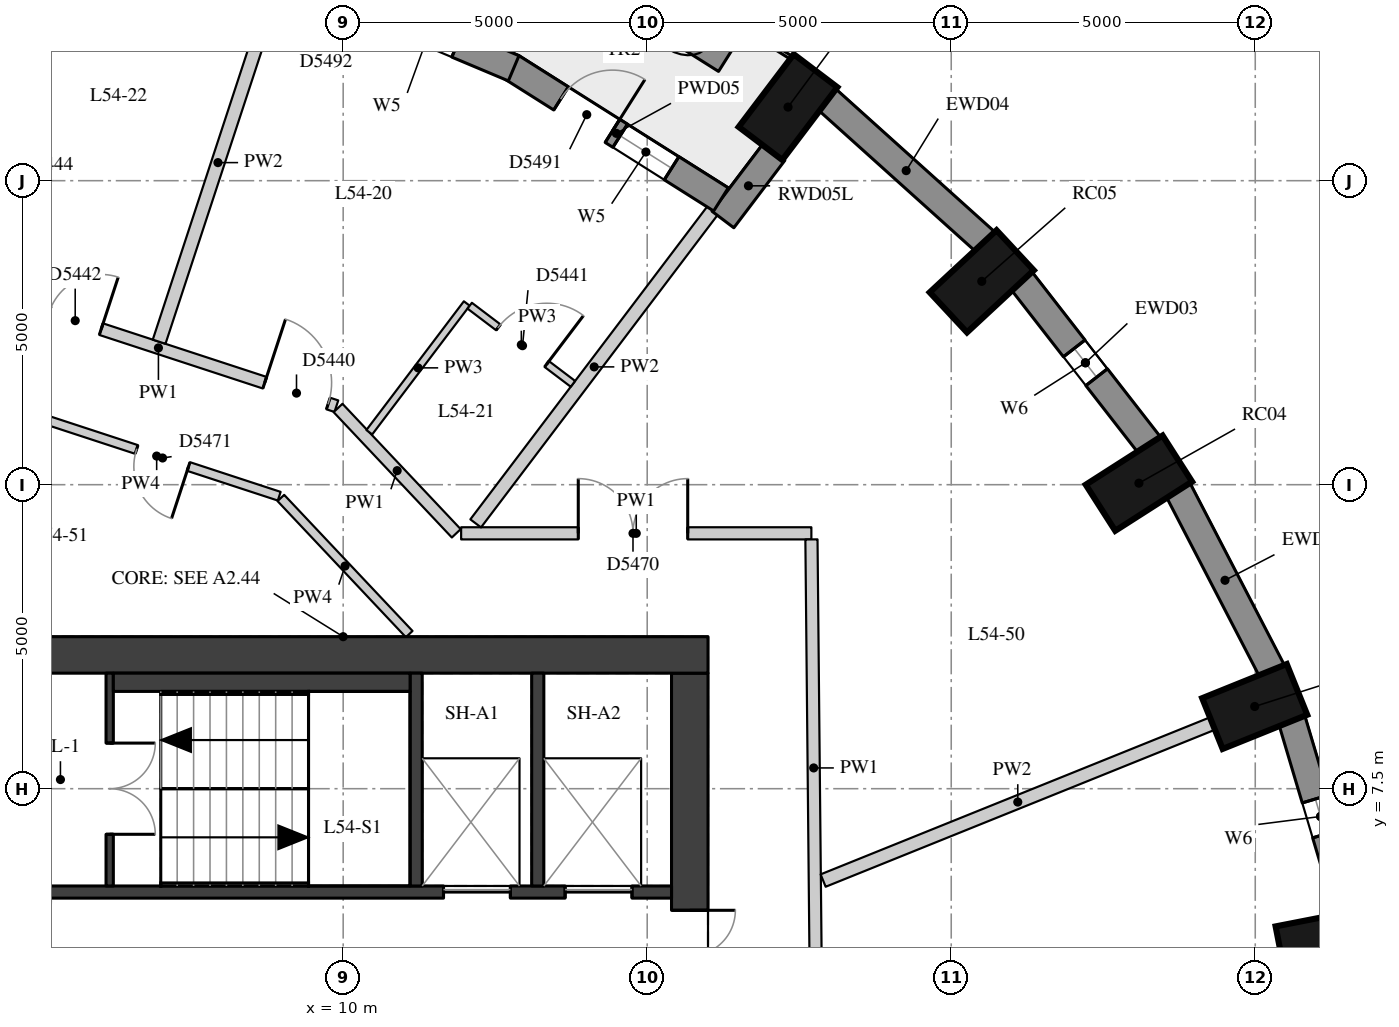
"""IFC4 building model, lengths in metres.
Left out: names, types, materials, properties, quantities, classifications, styles, units other than length and angle.
Written with IfcOpenShell. Run it as: python <this file> out.ifc"""

import sys

from ifc_helpers import new_model, si_unit, direction, frame, frame_2d, origin, origin_2d, place, context, subcontext, project, spatial, rectangle, extrude, element, fill, save


model = new_model("IFC4")
c1 = context("Model", 3, precision=1e-05, world=origin(), true_north=direction((0.0, 1.0)))
c2 = subcontext(c1, "Body", "Model", "MODEL_VIEW")
j1 = project(units=[si_unit("LENGTHUNIT", "METRE"), si_unit("PLANEANGLEUNIT", "RADIAN")], contexts=[c1])
p1 = place(None, origin())
s1 = spatial("IfcSite", under=j1, at=p1, CompositionType="ELEMENT")
p2 = place(p1, origin())
s2 = spatial("IfcBuilding", under=s1, at=p2, CompositionType="ELEMENT")
p3 = place(p2, frame((0.0, 0.0, 192.5)))
s3 = spatial("IfcBuildingStorey", under=s2, at=p3, CompositionType="ELEMENT", Elevation=192.5)
for number, where, z_axis, x_axis in (
    (1, (26.157, 4.937, 0.0), (0.0, 0.0, 1.0), (0.981, 0.192, 0.0)),
    (2, (24.991, 8.852, 0.0), (0.0, 0.0, 1.0), (0.927, 0.374, 0.0)),
    (3, (23.087, 12.525, 0.0), (0.0, 0.0, 1.0), (0.842, 0.539, 0.0)),
    (4, (20.502, 15.845, 0.0), (0.0, 0.0, 1.0), (0.732, 0.681, 0.0)),
    (5, (17.316, 18.71, 0.0), (0.0, 0.0, 1.0), (0.604, 0.797, 0.0)),
):
    element("IfcColumn", number, at=place(p3, frame(where, z_axis=z_axis, x_axis=x_axis)), inside=s3, PredefinedType="COLUMN", context=c2, shape_type="SweptSolid", body=[
        extrude(rectangle(XDim=1.5, YDim=0.9, at=origin_2d()), origin(), (0.0, 0.0, 1.0), 3.3),
    ])
p4 = place(p3, frame((26.548, 5.452, 0.0), z_axis=(0.0, 0.0, 1.0), x_axis=(-0.285444972963, 0.958395099847, 0.0)))
e6 = element("IfcWall", 6, at=p4, inside=s3, PredefinedType="SOLIDWALL", context=c2, shape_type="SweptSolid", body=[
    extrude(rectangle(XDim=3.32, YDim=0.45, at=frame_2d((1.66, 0.0))), origin(), (0.0, 0.0, 1.0), 3.02),
])
p5 = place(p4, frame((1.36, 0.0, 0.4)))
e7 = element("IfcOpeningElement", 7, at=p5, cuts=e6, PredefinedType="OPENING", context=c2, shape_type="SweptSolid", body=[
    extrude(rectangle(XDim=0.6, YDim=1.75, at=frame_2d((0.3, 0.875))), frame((0.0, 0.235, 0.0), z_axis=(0.0, -1.0, 0.0), x_axis=(1.0, 0.0, 0.0)), (0.0, 0.0, 1.0), 0.47),
])
p6 = place(p3, frame((25.278, 9.432, 0.0), z_axis=(0.0, 0.0, 1.0), x_axis=(-0.460175500475, 0.887827972505, 0.0)))
e8 = element("IfcWall", 8, at=p6, inside=s3, PredefinedType="SOLIDWALL", context=c2, shape_type="SweptSolid", body=[
    extrude(rectangle(XDim=3.371, YDim=0.45, at=frame_2d((1.685, 0.0))), origin(), (0.0, 0.0, 1.0), 3.02),
])
p7 = place(p3, frame((23.263, 13.148, 0.0), z_axis=(0.0, 0.0, 1.0), x_axis=(-0.614220816451, 0.789134201919, 0.0)))
e9 = element("IfcWall", 9, at=p7, inside=s3, PredefinedType="SOLIDWALL", context=c2, shape_type="SweptSolid", body=[
    extrude(rectangle(XDim=3.438, YDim=0.45, at=frame_2d((1.719, 0.0))), origin(), (0.0, 0.0, 1.0), 3.02),
])
p8 = place(p7, frame((1.419, 0.0, 0.4)))
e10 = element("IfcOpeningElement", 10, at=p8, cuts=e9, PredefinedType="OPENING", context=c2, shape_type="SweptSolid", body=[
    extrude(rectangle(XDim=0.6, YDim=1.75, at=frame_2d((0.3, 0.875))), frame((0.0, 0.235, 0.0), z_axis=(0.0, -1.0, 0.0), x_axis=(1.0, 0.0, 0.0)), (0.0, 0.0, 1.0), 0.47),
])
p9 = place(p3, frame((20.565, 16.49, 0.0), z_axis=(0.0, 0.0, 1.0), x_axis=(-0.743442727602, 0.668799604348, 0.0)))
e11 = element("IfcWall", 11, at=p9, inside=s3, PredefinedType="SOLIDWALL", context=c2, shape_type="SweptSolid", body=[
    extrude(rectangle(XDim=3.513, YDim=0.45, at=frame_2d((1.756, 0.0))), origin(), (0.0, 0.0, 1.0), 3.02),
])
p10 = place(p3, frame((17.085, 17.97, 0.0), z_axis=(0.0, 0.0, 1.0), x_axis=(-0.603644757989, -0.797253414011, 0.0)))
e12 = element("IfcWall", 12, at=p10, inside=s3, PredefinedType="SOLIDWALL", context=c2, shape_type="SweptSolid", body=[
    extrude(rectangle(XDim=1.391, YDim=0.45, at=frame_2d((0.695, 0.0))), origin(), (0.0, 0.0, 1.0), 3.02),
])
p11 = place(p3, frame((16.213, 17.192, 0.0), z_axis=(0.0, 0.0, 1.0), x_axis=(-0.84545185308, 0.534051649303, 0.0)))
e13 = element("IfcWall", 13, at=p11, inside=s3, PredefinedType="SOLIDWALL", context=c2, shape_type="SweptSolid", body=[
    extrude(rectangle(XDim=4.071, YDim=0.45, at=frame_2d((2.036, 0.0))), origin(), (0.0, 0.0, 1.0), 3.02),
])
p12 = place(p11, frame((0.961, 0.0, 0.4)))
e14 = element("IfcOpeningElement", 14, at=p12, cuts=e13, PredefinedType="OPENING", context=c2, shape_type="SweptSolid", body=[
    extrude(rectangle(XDim=1.0, YDim=1.75, at=frame_2d((0.5, 0.875))), frame((0.0, 0.235, 0.0), z_axis=(0.0, -1.0, 0.0), x_axis=(1.0, 0.0, 0.0)), (0.0, 0.0, 1.0), 0.47),
])
p13 = place(p11, frame((2.111, 0.0, 0.0)))
e15 = element("IfcOpeningElement", 15, at=p13, cuts=e13, PredefinedType="OPENING", context=c2, shape_type="SweptSolid", body=[
    extrude(rectangle(XDim=1.0, YDim=2.15, at=frame_2d((0.5, 1.075))), frame((0.0, 0.235, 0.0), z_axis=(0.0, -1.0, 0.0), x_axis=(1.0, 0.0, 0.0)), (0.0, 0.0, 1.0), 0.47),
])
p14 = place(p3, frame((12.804, 19.349, 0.0), z_axis=(0.0, 0.0, 1.0), x_axis=(-0.921751093055, 0.387782055351, 0.0)))
e16 = element("IfcWall", 16, at=p14, inside=s3, PredefinedType="SOLIDWALL", context=c2, shape_type="SweptSolid", body=[
    extrude(rectangle(XDim=4.168, YDim=0.45, at=frame_2d((2.084, 0.0))), origin(), (0.0, 0.0, 1.0), 3.02),
])
p15 = place(p14, frame((1.009, 0.0, 0.4)))
e17 = element("IfcOpeningElement", 17, at=p15, cuts=e16, PredefinedType="OPENING", context=c2, shape_type="SweptSolid", body=[
    extrude(rectangle(XDim=1.0, YDim=1.75, at=frame_2d((0.5, 0.875))), frame((0.0, 0.235, 0.0), z_axis=(0.0, -1.0, 0.0), x_axis=(1.0, 0.0, 0.0)), (0.0, 0.0, 1.0), 0.47),
])
p16 = place(p14, frame((2.159, 0.0, 0.0)))
e18 = element("IfcOpeningElement", 18, at=p16, cuts=e16, PredefinedType="OPENING", context=c2, shape_type="SweptSolid", body=[
    extrude(rectangle(XDim=1.0, YDim=2.15, at=frame_2d((0.5, 1.075))), frame((0.0, 0.235, 0.0), z_axis=(0.0, -1.0, 0.0), x_axis=(1.0, 0.0, 0.0)), (0.0, 0.0, 1.0), 0.47),
])
p17 = place(p3, frame((16.36, 19.593, 0.0), z_axis=(0.0, 0.0, 1.0), x_axis=(-0.846149017978, 0.532946375703, 0.0)))
e19 = element("IfcWall", 19, at=p17, inside=s3, PredefinedType="USERDEFINED", context=c2, shape_type="SweptSolid", body=[
    extrude(rectangle(XDim=1.8, YDim=0.7, at=frame_2d((0.9, 0.0))), origin(), (0.0, 0.0, 1.0), 0.75),
])
p18 = place(p3, frame((15.7, -9.4, 0.0), z_axis=(0.0, 0.0, 1.0), x_axis=(0.0, 1.0, 0.0)))
e20 = element("IfcWall", 20, at=p18, inside=s3, PredefinedType="SHEAR", context=c2, shape_type="SweptSolid", body=[
    extrude(rectangle(XDim=18.8, YDim=0.6, at=frame_2d((9.4, 0.0))), origin(), (0.0, 0.0, 1.0), 3.02),
])
p19 = place(p18, frame((13.4, 0.0, 0.0)))
e21 = element("IfcOpeningElement", 21, at=p19, cuts=e20, PredefinedType="OPENING", context=c2, shape_type="SweptSolid", body=[
    extrude(rectangle(XDim=1.5, YDim=2.1, at=frame_2d((0.75, 1.05))), frame((0.0, 0.31, 0.0), z_axis=(0.0, -1.0, 0.0), x_axis=(1.0, 0.0, 0.0)), (0.0, 0.0, 1.0), 0.62),
])
p20 = place(p18, frame((3.9, 0.0, 0.0)))
e22 = element("IfcOpeningElement", 22, at=p20, cuts=e20, PredefinedType="OPENING", context=c2, shape_type="SweptSolid", body=[
    extrude(rectangle(XDim=1.5, YDim=2.1, at=frame_2d((0.75, 1.05))), frame((0.0, 0.31, 0.0), z_axis=(0.0, -1.0, 0.0), x_axis=(1.0, 0.0, 0.0)), (0.0, 0.0, 1.0), 0.62),
])
p21 = place(p3, frame((4.0, 9.7, 0.0), z_axis=(0.0, 0.0, 1.0), x_axis=(1.0, 0.0, 0.0)))
e23 = element("IfcWall", 23, at=p21, inside=s3, PredefinedType="SHEAR", context=c2, shape_type="SweptSolid", body=[
    extrude(rectangle(XDim=12.0, YDim=0.6, at=frame_2d((6.0, 0.0))), origin(), (0.0, 0.0, 1.0), 3.02),
])
p22 = place(p3, frame((4.6, 5.8, 0.0), z_axis=(0.0, 0.0, 1.0), x_axis=(1.0, 0.0, 0.0)))
e24 = element("IfcWall", 24, at=p22, inside=s3, PredefinedType="SHEAR", context=c2, shape_type="SweptSolid", body=[
    extrude(rectangle(XDim=10.8, YDim=0.2, at=frame_2d((5.4, 0.0))), origin(), (0.0, 0.0, 1.0), 3.02),
])
p23 = place(p22, frame((7.05, 0.0, 0.0)))
e25 = element("IfcOpeningElement", 25, at=p23, cuts=e24, PredefinedType="OPENING", context=c2, shape_type="SweptSolid", body=[
    extrude(rectangle(XDim=1.1, YDim=2.1, at=frame_2d((0.55, 1.05))), frame((0.0, 0.11, 0.0), z_axis=(0.0, -1.0, 0.0), x_axis=(1.0, 0.0, 0.0)), (0.0, 0.0, 1.0), 0.22),
])
p24 = place(p22, frame((9.05, 0.0, 0.0)))
e26 = element("IfcOpeningElement", 26, at=p24, cuts=e24, PredefinedType="OPENING", context=c2, shape_type="SweptSolid", body=[
    extrude(rectangle(XDim=1.1, YDim=2.1, at=frame_2d((0.55, 1.05))), frame((0.0, 0.11, 0.0), z_axis=(0.0, -1.0, 0.0), x_axis=(1.0, 0.0, 0.0)), (0.0, 0.0, 1.0), 0.22),
])
for number, where, z_axis, x_axis in (
    (27, (11.2, 5.9, 0.0), (0.0, 0.0, 1.0), (0.0, 1.0, 0.0)),
    (28, (13.2, 5.9, 0.0), (0.0, 0.0, 1.0), (0.0, 1.0, 0.0)),
):
    element("IfcWall", number, at=place(p3, frame(where, z_axis=z_axis, x_axis=x_axis)), inside=s3, PredefinedType="SHEAR", context=c2, shape_type="SweptSolid", body=[
        extrude(rectangle(XDim=3.5, YDim=0.2, at=frame_2d((1.75, 0.0))), origin(), (0.0, 0.0, 1.0), 3.02),
    ])
p25 = place(p3, frame((6.16, 5.9, 0.0), z_axis=(0.0, 0.0, 1.0), x_axis=(0.0, 1.0, 0.0)))
e29 = element("IfcWall", 29, at=p25, inside=s3, PredefinedType="SHEAR", context=c2, shape_type="SweptSolid", body=[
    extrude(rectangle(XDim=3.5, YDim=0.12, at=frame_2d((1.75, 0.0))), origin(), (0.0, 0.0, 1.0), 3.02),
])
p26 = place(p25, frame((0.85, 0.0, 0.0)))
e30 = element("IfcOpeningElement", 30, at=p26, cuts=e29, PredefinedType="OPENING", context=c2, shape_type="SweptSolid", body=[
    extrude(rectangle(XDim=1.5, YDim=2.1, at=frame_2d((0.75, 1.05))), frame((0.0, 0.07, 0.0), z_axis=(0.0, -1.0, 0.0), x_axis=(1.0, 0.0, 0.0)), (0.0, 0.0, 1.0), 0.14),
])
p27 = place(p3, frame((6.22, 9.25, 0.0), z_axis=(0.0, 0.0, 1.0), x_axis=(1.0, 0.0, 0.0)))
e31 = element("IfcWall", 31, at=p27, inside=s3, PredefinedType="PARTITIONING", context=c2, shape_type="SweptSolid", body=[
    extrude(rectangle(XDim=4.88, YDim=0.3, at=frame_2d((2.44, 0.0))), origin(), (0.0, 0.0, 1.0), 3.02),
])
p28 = place(p3, frame((4.035, 15.708, 0.0), z_axis=(0.0, 0.0, 1.0), x_axis=(0.950331063317, -0.31124085544, 0.0)))
e32 = element("IfcWall", 32, at=p28, inside=s3, PredefinedType="PARTITIONING", context=c2, shape_type="SweptSolid", body=[
    extrude(rectangle(XDim=6.159, YDim=0.2, at=frame_2d((3.08, 0.0))), origin(), (0.0, 0.0, 1.0), 3.02),
])
p29 = place(p28, frame((4.919, 0.0, 0.0)))
e33 = element("IfcOpeningElement", 33, at=p29, cuts=e32, PredefinedType="OPENING", context=c2, shape_type="SweptSolid", body=[
    extrude(rectangle(XDim=1.1, YDim=2.1, at=frame_2d((0.55, 1.05))), frame((0.0, 0.11, 0.0), z_axis=(0.0, -1.0, 0.0), x_axis=(1.0, 0.0, 0.0)), (0.0, 0.0, 1.0), 0.22),
])
p30 = place(p28, frame((1.189, 0.0, 0.0)))
e34 = element("IfcOpeningElement", 34, at=p30, cuts=e32, PredefinedType="OPENING", context=c2, shape_type="SweptSolid", body=[
    extrude(rectangle(XDim=0.9, YDim=2.1, at=frame_2d((0.45, 1.05))), frame((0.0, 0.11, 0.0), z_axis=(0.0, -1.0, 0.0), x_axis=(1.0, 0.0, 0.0)), (0.0, 0.0, 1.0), 0.22),
])
p31 = place(p3, frame((9.916, 13.762, 0.0), z_axis=(0.0, 0.0, 1.0), x_axis=(0.686041532799, -0.727562378958, 0.0)))
e35 = element("IfcWall", 35, at=p31, inside=s3, PredefinedType="PARTITIONING", context=c2, shape_type="SweptSolid", body=[
    extrude(rectangle(XDim=2.834, YDim=0.2, at=frame_2d((1.417, 0.0))), origin(), (0.0, 0.0, 1.0), 3.02),
])
p32 = place(p3, frame((11.94, 11.7, 0.0), z_axis=(0.0, 0.0, 1.0), x_axis=(1.0, 0.0, 0.0)))
e36 = element("IfcWall", 36, at=p32, inside=s3, PredefinedType="PARTITIONING", context=c2, shape_type="SweptSolid", body=[
    extrude(rectangle(XDim=5.76, YDim=0.2, at=frame_2d((2.88, 0.0))), origin(), (0.0, 0.0, 1.0), 3.02),
])
p33 = place(p32, frame((1.927, 0.0, 0.0)))
e37 = element("IfcOpeningElement", 37, at=p33, cuts=e36, PredefinedType="OPENING", context=c2, shape_type="SweptSolid", body=[
    extrude(rectangle(XDim=1.8, YDim=2.1, at=frame_2d((0.9, 1.05))), frame((0.0, 0.11, 0.0), z_axis=(0.0, -1.0, 0.0), x_axis=(1.0, 0.0, 0.0)), (0.0, 0.0, 1.0), 0.22),
])
p34 = place(p3, frame((17.701, 11.6, 0.0), z_axis=(0.0, 0.0, 1.0), x_axis=(0.009840700525, -0.999951579134, 0.0)))
e38 = element("IfcWall", 38, at=p34, inside=s3, PredefinedType="PARTITIONING", context=c2, shape_type="SweptSolid", body=[
    extrude(rectangle(XDim=7.517, YDim=0.2, at=frame_2d((3.759, 0.0))), origin(), (0.0, 0.0, 1.0), 3.02),
])
p35 = place(p3, frame((4.917, 13.631, 0.0), z_axis=(0.0, 0.0, 1.0), x_axis=(0.950299632499, -0.311336808733, 0.0)))
e39 = element("IfcWall", 39, at=p35, inside=s3, PredefinedType="PARTITIONING", context=c2, shape_type="SweptSolid", body=[
    extrude(rectangle(XDim=4.241, YDim=0.15, at=frame_2d((2.121, 0.0))), origin(), (0.0, 0.0, 1.0), 3.02),
])
p36 = place(p35, frame((1.773, 0.0, 0.0)))
e40 = element("IfcOpeningElement", 40, at=p36, cuts=e39, PredefinedType="OPENING", context=c2, shape_type="SweptSolid", body=[
    extrude(rectangle(XDim=0.9, YDim=2.1, at=frame_2d((0.45, 1.05))), frame((0.0, 0.085, 0.0), z_axis=(0.0, -1.0, 0.0), x_axis=(1.0, 0.0, 0.0)), (0.0, 0.0, 1.0), 0.17),
])
p37 = place(p3, frame((8.975, 12.281, 0.0), z_axis=(0.0, 0.0, 1.0), x_axis=(0.686010468192, -0.727591669503, 0.0)))
e41 = element("IfcWall", 41, at=p37, inside=s3, PredefinedType="PARTITIONING", context=c2, shape_type="SweptSolid", body=[
    extrude(rectangle(XDim=3.077, YDim=0.15, at=frame_2d((1.538, 0.0))), origin(), (0.0, 0.0, 1.0), 3.02),
])
p38 = place(p3, frame((24.295, 8.571, 0.0), z_axis=(0.0, 0.0, 1.0), x_axis=(-0.927397147779, -0.374078240869, 0.0)))
e42 = element("IfcWall", 42, at=p38, inside=s3, PredefinedType="PARTITIONING", context=c2, shape_type="SweptSolid", body=[
    extrude(rectangle(XDim=6.903, YDim=0.22, at=frame_2d((3.452, 0.0))), origin(), (0.0, 0.0, 1.0), 3.02),
])
p39 = place(p3, frame((16.077, 17.011, 0.0), z_axis=(0.0, 0.0, 1.0), x_axis=(-0.603635635975, -0.797260320712, 0.0)))
e43 = element("IfcWall", 43, at=p39, inside=s3, PredefinedType="PARTITIONING", context=c2, shape_type="SweptSolid", body=[
    extrude(rectangle(XDim=6.457, YDim=0.22, at=frame_2d((3.229, 0.0))), origin(), (0.0, 0.0, 1.0), 3.02),
])
p40 = place(p3, frame((8.908, 20.743, 0.0), z_axis=(0.0, 0.0, 1.0), x_axis=(-0.311984764468, -0.950087104817, 0.0)))
e44 = element("IfcWall", 44, at=p40, inside=s3, PredefinedType="PARTITIONING", context=c2, shape_type="SweptSolid", body=[
    extrude(rectangle(XDim=6.202, YDim=0.22, at=frame_2d((3.101, 0.0))), origin(), (0.0, 0.0, 1.0), 3.02),
])
p41 = place(p3, frame((10.43, 13.363, 0.0), z_axis=(0.0, 0.0, 1.0), x_axis=(0.603597479969, 0.797289208616, 0.0)))
e45 = element("IfcWall", 45, at=p41, inside=s3, PredefinedType="PARTITIONING", context=c2, shape_type="SweptSolid", body=[
    extrude(rectangle(XDim=2.656, YDim=0.12, at=frame_2d((1.328, 0.0))), origin(), (0.0, 0.0, 1.0), 3.02),
])
p42 = place(p3, frame((12.081, 15.444, 0.0), z_axis=(0.0, 0.0, 1.0), x_axis=(0.797240905551, -0.603661277967, 0.0)))
e46 = element("IfcWall", 46, at=p42, inside=s3, PredefinedType="PARTITIONING", context=c2, shape_type="SweptSolid", body=[
    extrude(rectangle(XDim=2.13, YDim=0.12, at=frame_2d((1.065, 0.0))), origin(), (0.0, 0.0, 1.0), 3.02),
])
p43 = place(p42, frame((0.59, 0.0, 0.0)))
e47 = element("IfcOpeningElement", 47, at=p43, cuts=e46, PredefinedType="OPENING", context=c2, shape_type="SweptSolid", body=[
    extrude(rectangle(XDim=1.0, YDim=2.1, at=frame_2d((0.5, 1.05))), frame((0.0, 0.07, 0.0), z_axis=(0.0, -1.0, 0.0), x_axis=(1.0, 0.0, 0.0)), (0.0, 0.0, 1.0), 0.14),
])
p44 = place(p5, origin())
e48 = element("IfcWindow", 48, at=p44, inside=s3, PartitioningType="SINGLE_PANEL", PredefinedType="WINDOW", context=c2, shape_type="SweptSolid", body=[
    extrude(rectangle(XDim=0.6, YDim=1.75, at=frame_2d((0.3, 0.875))), frame((0.0, 0.035, 0.0), z_axis=(0.0, -1.0, 0.0), x_axis=(1.0, 0.0, 0.0)), (0.0, 0.0, 1.0), 0.06),
])
fill(e7, e48)
p45 = place(p8, origin())
e49 = element("IfcWindow", 49, at=p45, inside=s3, PartitioningType="SINGLE_PANEL", PredefinedType="WINDOW", context=c2, shape_type="SweptSolid", body=[
    extrude(rectangle(XDim=0.6, YDim=1.75, at=frame_2d((0.3, 0.875))), frame((0.0, 0.035, 0.0), z_axis=(0.0, -1.0, 0.0), x_axis=(1.0, 0.0, 0.0)), (0.0, 0.0, 1.0), 0.06),
])
fill(e10, e49)
p46 = place(p12, origin())
e50 = element("IfcWindow", 50, at=p46, inside=s3, PartitioningType="SINGLE_PANEL", PredefinedType="WINDOW", context=c2, shape_type="SweptSolid", body=[
    extrude(rectangle(XDim=1.0, YDim=1.75, at=frame_2d((0.5, 0.875))), frame((0.0, 0.035, 0.0), z_axis=(0.0, -1.0, 0.0), x_axis=(1.0, 0.0, 0.0)), (0.0, 0.0, 1.0), 0.06),
])
fill(e14, e50)
p47 = place(p13, frame((1.0, 0.0, 0.0), z_axis=(0.0, 0.0, 1.0), x_axis=(-1.0, 0.0, 0.0)))
e51 = element("IfcDoor", 51, at=p47, inside=s3, OperationType="SINGLE_SWING_RIGHT", PredefinedType="DOOR", context=c2, shape_type="SweptSolid", body=[
    extrude(rectangle(XDim=1.0, YDim=2.15, at=frame_2d((0.5, 1.075))), frame((0.0, 0.075, 0.0), z_axis=(0.0, -1.0, 0.0), x_axis=(1.0, 0.0, 0.0)), (0.0, 0.0, 1.0), 0.05),
])
fill(e15, e51)
p48 = place(p19, origin())
e52 = element("IfcDoor", 52, at=p48, inside=s3, OperationType="DOUBLE_DOOR_SINGLE_SWING", PredefinedType="DOOR", context=c2, shape_type="SweptSolid", body=[
    extrude(rectangle(XDim=1.5, YDim=2.1, at=frame_2d((0.75, 1.05))), frame((0.0, 0.025, 0.0), z_axis=(0.0, -1.0, 0.0), x_axis=(1.0, 0.0, 0.0)), (0.0, 0.0, 1.0), 0.05),
])
fill(e21, e52)
p49 = place(p26, origin())
e53 = element("IfcDoor", 53, at=p49, inside=s3, OperationType="DOUBLE_DOOR_SINGLE_SWING", PredefinedType="DOOR", context=c2, shape_type="SweptSolid", body=[
    extrude(rectangle(XDim=1.5, YDim=2.1, at=frame_2d((0.75, 1.05))), frame((0.0, 0.025, 0.0), z_axis=(0.0, -1.0, 0.0), x_axis=(1.0, 0.0, 0.0)), (0.0, 0.0, 1.0), 0.05),
])
fill(e30, e53)
p50 = place(p23, origin())
e54 = element("IfcDoor", 54, at=p50, inside=s3, OperationType="DOUBLE_DOOR_SLIDING", PredefinedType="DOOR", context=c2, shape_type="SweptSolid", body=[
    extrude(rectangle(XDim=1.1, YDim=2.1, at=frame_2d((0.55, 1.05))), frame((0.0, 0.025, 0.0), z_axis=(0.0, -1.0, 0.0), x_axis=(1.0, 0.0, 0.0)), (0.0, 0.0, 1.0), 0.05),
])
fill(e25, e54)
p51 = place(p24, origin())
e55 = element("IfcDoor", 55, at=p51, inside=s3, OperationType="DOUBLE_DOOR_SLIDING", PredefinedType="DOOR", context=c2, shape_type="SweptSolid", body=[
    extrude(rectangle(XDim=1.1, YDim=2.1, at=frame_2d((0.55, 1.05))), frame((0.0, 0.025, 0.0), z_axis=(0.0, -1.0, 0.0), x_axis=(1.0, 0.0, 0.0)), (0.0, 0.0, 1.0), 0.05),
])
fill(e26, e55)
p52 = place(p29, origin())
e56 = element("IfcDoor", 56, at=p52, inside=s3, OperationType="SINGLE_SWING_LEFT", PredefinedType="DOOR", context=c2, shape_type="SweptSolid", body=[
    extrude(rectangle(XDim=1.1, YDim=2.1, at=frame_2d((0.55, 1.05))), frame((0.0, 0.025, 0.0), z_axis=(0.0, -1.0, 0.0), x_axis=(1.0, 0.0, 0.0)), (0.0, 0.0, 1.0), 0.05),
])
fill(e33, e56)
p53 = place(p43, origin())
e57 = element("IfcDoor", 57, at=p53, inside=s3, OperationType="SINGLE_SWING_RIGHT", PredefinedType="DOOR", context=c2, shape_type="SweptSolid", body=[
    extrude(rectangle(XDim=1.0, YDim=2.1, at=frame_2d((0.5, 1.05))), frame((0.0, 0.025, 0.0), z_axis=(0.0, -1.0, 0.0), x_axis=(1.0, 0.0, 0.0)), (0.0, 0.0, 1.0), 0.05),
])
fill(e47, e57)
p54 = place(p30, origin())
e58 = element("IfcDoor", 58, at=p54, inside=s3, OperationType="SINGLE_SWING_RIGHT", PredefinedType="DOOR", context=c2, shape_type="SweptSolid", body=[
    extrude(rectangle(XDim=0.9, YDim=2.1, at=frame_2d((0.45, 1.05))), frame((0.0, 0.025, 0.0), z_axis=(0.0, -1.0, 0.0), x_axis=(1.0, 0.0, 0.0)), (0.0, 0.0, 1.0), 0.05),
])
fill(e34, e58)
p55 = place(p33, origin())
e59 = element("IfcDoor", 59, at=p55, inside=s3, OperationType="DOUBLE_DOOR_SINGLE_SWING", PredefinedType="DOOR", context=c2, shape_type="SweptSolid", body=[
    extrude(rectangle(XDim=1.8, YDim=2.1, at=frame_2d((0.9, 1.05))), frame((0.0, 0.025, 0.0), z_axis=(0.0, -1.0, 0.0), x_axis=(1.0, 0.0, 0.0)), (0.0, 0.0, 1.0), 0.05),
])
fill(e37, e59)
p56 = place(p36, origin())
e60 = element("IfcDoor", 60, at=p56, inside=s3, OperationType="SINGLE_SWING_LEFT", PredefinedType="DOOR", context=c2, shape_type="SweptSolid", body=[
    extrude(rectangle(XDim=0.9, YDim=2.1, at=frame_2d((0.45, 1.05))), frame((0.0, 0.025, 0.0), z_axis=(0.0, -1.0, 0.0), x_axis=(1.0, 0.0, 0.0)), (0.0, 0.0, 1.0), 0.05),
])
fill(e40, e60)
save(model, sys.argv[1])
